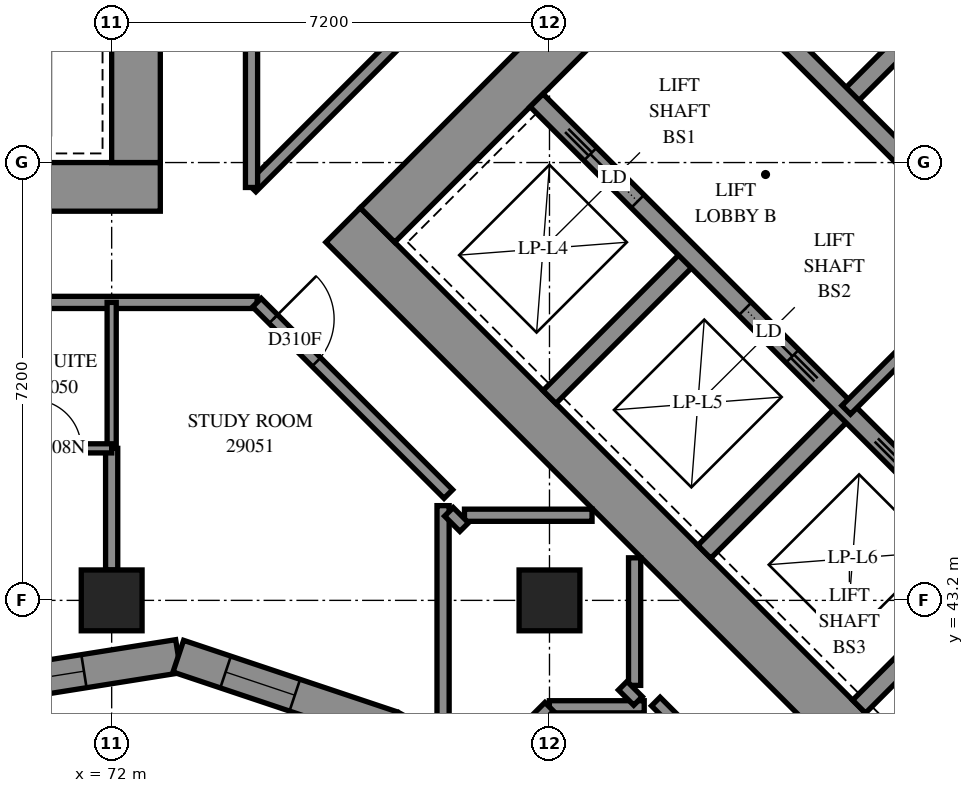
"""IFC4 building model, lengths in metres.
Left out: names, types, materials, properties, quantities, classifications, styles, units other than length and angle.
Written with IfcOpenShell. Run it as: python <this file> out.ifc"""

import sys

from ifc_helpers import new_model, si_unit, direction, frame, frame_2d, origin, origin_2d, place, context, subcontext, project, spatial, polyline, rectangle, outline, extrude, element, fill, save


model = new_model("IFC4")
c1 = context("Model", 3, precision=1e-05, world=origin(), true_north=direction((0.0, 1.0)))
c2 = subcontext(c1, "Body", "Model", "MODEL_VIEW")
j1 = project(units=[si_unit("LENGTHUNIT", "METRE"), si_unit("PLANEANGLEUNIT", "RADIAN")], contexts=[c1])
p1 = place(None, origin())
s1 = spatial("IfcSite", under=j1, at=p1, CompositionType="ELEMENT")
p2 = place(p1, origin())
s2 = spatial("IfcBuilding", under=s1, at=p2, CompositionType="ELEMENT")
p3 = place(p2, frame((0.0, 0.0, 108.4)))
s3 = spatial("IfcBuildingStorey", under=s2, at=p3, CompositionType="ELEMENT", Elevation=108.4)
for number, where, z_axis, x_axis in (
    (1, (72.0, 43.2, 0.0), (0.0, 0.0, 1.0), (1.0, 0.0, 0.0)),
    (2, (79.2, 43.2, 0.0), (0.0, 0.0, 1.0), (1.0, 0.0, 0.0)),
):
    element("IfcColumn", number, at=place(p3, frame(where, z_axis=z_axis, x_axis=x_axis)), inside=s3, PredefinedType="COLUMN", context=c2, shape_type="SweptSolid", body=[
        extrude(rectangle(XDim=1.0, YDim=1.0, at=origin_2d()), origin(), (0.0, 0.0, 1.0), 3.1),
    ])
p4 = place(p3, frame((56.8, 50.0, -0.3), z_axis=(0.0, 0.0, 1.0), x_axis=(1.0, 0.0, 0.0)))
e3 = element("IfcWall", 3, at=p4, inside=s3, PredefinedType="SHEAR", context=c2, shape_type="SweptSolid", body=[
    extrude(rectangle(XDim=16.0, YDim=0.8, at=frame_2d((8.0, 0.0))), origin(), (0.0, 0.0, 1.0), 2.7),
])
p5 = place(p3, frame((72.4, 50.4, -0.3), z_axis=(0.0, 0.0, 1.0), x_axis=(0.0, 1.0, 0.0)))
e4 = element("IfcWall", 4, at=p5, inside=s3, PredefinedType="SHEAR", context=c2, shape_type="SweptSolid", body=[
    extrude(rectangle(XDim=14.4, YDim=0.8, at=frame_2d((7.2, 0.0))), origin(), (0.0, 0.0, 1.0), 2.7),
])
p6 = place(p5, frame((4.55, 0.0, 0.3)))
e5 = element("IfcOpeningElement", 5, at=p6, cuts=e4, PredefinedType="OPENING", context=c2, shape_type="SweptSolid", body=[
    extrude(rectangle(XDim=1.1, YDim=2.1, at=frame_2d((0.55, 1.05))), frame((0.0, 0.41, 0.0), z_axis=(0.0, -1.0, 0.0), x_axis=(1.0, 0.0, 0.0)), (0.0, 0.0, 1.0), 0.82),
])
p7 = place(p5, frame((11.35, 0.0, 0.3)))
e6 = element("IfcOpeningElement", 6, at=p7, cuts=e4, PredefinedType="OPENING", context=c2, shape_type="SweptSolid", body=[
    extrude(rectangle(XDim=1.1, YDim=2.1, at=frame_2d((0.55, 1.05))), frame((0.0, 0.41, 0.0), z_axis=(0.0, -1.0, 0.0), x_axis=(1.0, 0.0, 0.0)), (0.0, 0.0, 1.0), 0.82),
])
p8 = place(p3, frame((75.806, 49.373, -0.3), z_axis=(0.0, 0.0, 1.0), x_axis=(0.7071067812, -0.7071067812, 0.0)))
e7 = element("IfcWall", 7, at=p8, inside=s3, PredefinedType="SHEAR", context=c2, shape_type="SweptSolid", body=[
    extrude(rectangle(XDim=16.0, YDim=0.8, at=frame_2d((8.0, 0.0))), origin(), (0.0, 0.0, 1.0), 2.7),
])
p9 = place(p3, frame((76.372, 49.373, -0.3), z_axis=(0.0, 0.0, 1.0), x_axis=(0.7071067812, 0.7071067812, 0.0)))
e8 = element("IfcWall", 8, at=p9, inside=s3, PredefinedType="SHEAR", context=c2, shape_type="SweptSolid", body=[
    extrude(rectangle(XDim=14.4, YDim=0.8, at=frame_2d((7.2, 0.0))), origin(), (0.0, 0.0, 1.0), 2.7),
])
p10 = place(p9, frame((4.55, 0.0, 0.3)))
e9 = element("IfcOpeningElement", 9, at=p10, cuts=e8, PredefinedType="OPENING", context=c2, shape_type="SweptSolid", body=[
    extrude(rectangle(XDim=1.1, YDim=2.1, at=frame_2d((0.55, 1.05))), frame((0.0, 0.41, 0.0), z_axis=(0.0, -1.0, 0.0), x_axis=(1.0, 0.0, 0.0)), (0.0, 0.0, 1.0), 0.82),
])
p11 = place(p9, frame((11.35, 0.0, 0.3)))
e10 = element("IfcOpeningElement", 10, at=p11, cuts=e8, PredefinedType="OPENING", context=c2, shape_type="SweptSolid", body=[
    extrude(rectangle(XDim=1.1, YDim=2.1, at=frame_2d((0.55, 1.05))), frame((0.0, 0.41, 0.0), z_axis=(0.0, -1.0, 0.0), x_axis=(1.0, 0.0, 0.0)), (0.0, 0.0, 1.0), 0.82),
])
for number, where, z_axis, x_axis in (
    (11, (79.2, 46.544, 0.0), (0.0, 0.0, 1.0), (0.707, 0.707, 0.0)),
    (12, (84.079, 51.423, 0.0), (0.0, 0.0, 1.0), (0.707, 0.707, 0.0)),
):
    element("IfcWall", number, at=place(p3, frame(where, z_axis=z_axis, x_axis=x_axis)), inside=s3, PredefinedType="SOLIDWALL", context=c2, shape_type="SweptSolid", body=[
        extrude(rectangle(XDim=3.3, YDim=0.3, at=frame_2d((1.65, 0.0))), origin(), (0.0, 0.0, 1.0), 3.1),
    ])
for number, where, z_axis, x_axis in (
    (13, (81.746, 43.999, 0.0), (0.0, 0.0, 1.0), (0.707, 0.707, 0.0)),
    (14, (84.291, 41.453, 0.0), (0.0, 0.0, 1.0), (0.707, 0.707, 0.0)),
):
    element("IfcWall", number, at=place(p3, frame(where, z_axis=z_axis, x_axis=x_axis)), inside=s3, PredefinedType="SOLIDWALL", context=c2, shape_type="SweptSolid", body=[
        extrude(rectangle(XDim=3.3, YDim=0.3, at=frame_2d((1.65, 0.0))), origin(), (0.0, 0.0, 1.0), 3.1),
    ])
p12 = place(p3, frame((78.988, 51.423, 0.0), z_axis=(0.0, 0.0, 1.0), x_axis=(0.7071067812, -0.7071067812, 0.0)))
e15 = element("IfcWall", 15, at=p12, inside=s3, PredefinedType="SOLIDWALL", context=c2, shape_type="SweptSolid", body=[
    extrude(rectangle(XDim=14.4, YDim=0.3, at=frame_2d((7.2, 0.0))), origin(), (0.0, 0.0, 1.0), 3.1),
])
p13 = place(p12, frame((1.25, 0.0, 0.0)))
e16 = element("IfcOpeningElement", 16, at=p13, cuts=e15, PredefinedType="OPENING", context=c2, shape_type="SweptSolid", body=[
    extrude(rectangle(XDim=1.1, YDim=2.1, at=frame_2d((0.55, 1.05))), frame((0.0, 0.16, 0.0), z_axis=(0.0, -1.0, 0.0), x_axis=(1.0, 0.0, 0.0)), (0.0, 0.0, 1.0), 0.32),
])
p14 = place(p12, frame((4.85, 0.0, 0.0)))
e17 = element("IfcOpeningElement", 17, at=p14, cuts=e15, PredefinedType="OPENING", context=c2, shape_type="SweptSolid", body=[
    extrude(rectangle(XDim=1.1, YDim=2.1, at=frame_2d((0.55, 1.05))), frame((0.0, 0.16, 0.0), z_axis=(0.0, -1.0, 0.0), x_axis=(1.0, 0.0, 0.0)), (0.0, 0.0, 1.0), 0.32),
])
p15 = place(p12, frame((8.45, 0.0, 0.0)))
e18 = element("IfcOpeningElement", 18, at=p15, cuts=e15, PredefinedType="OPENING", context=c2, shape_type="SweptSolid", body=[
    extrude(rectangle(XDim=1.1, YDim=2.1, at=frame_2d((0.55, 1.05))), frame((0.0, 0.16, 0.0), z_axis=(0.0, -1.0, 0.0), x_axis=(1.0, 0.0, 0.0)), (0.0, 0.0, 1.0), 0.32),
])
p16 = place(p12, frame((12.05, 0.0, 0.0)))
e19 = element("IfcOpeningElement", 19, at=p16, cuts=e15, PredefinedType="OPENING", context=c2, shape_type="SweptSolid", body=[
    extrude(rectangle(XDim=1.1, YDim=2.1, at=frame_2d((0.55, 1.05))), frame((0.0, 0.16, 0.0), z_axis=(0.0, -1.0, 0.0), x_axis=(1.0, 0.0, 0.0)), (0.0, 0.0, 1.0), 0.32),
])
p17 = place(p3, frame((81.534, 53.969, 0.0), z_axis=(0.0, 0.0, 1.0), x_axis=(0.707103309, -0.7071102534, 0.0)))
e20 = element("IfcWall", 20, at=p17, inside=s3, PredefinedType="SOLIDWALL", context=c2, shape_type="SweptSolid", body=[
    extrude(rectangle(XDim=14.4, YDim=0.3, at=frame_2d((7.2, 0.0))), origin(), (0.0, 0.0, 1.0), 3.1),
])
p18 = place(p17, frame((12.05, 0.0, 0.0)))
e21 = element("IfcOpeningElement", 21, at=p18, cuts=e20, PredefinedType="OPENING", context=c2, shape_type="SweptSolid", body=[
    extrude(rectangle(XDim=1.1, YDim=2.1, at=frame_2d((0.55, 1.05))), frame((0.0, 0.16, 0.0), z_axis=(0.0, -1.0, 0.0), x_axis=(1.0, 0.0, 0.0)), (0.0, 0.0, 1.0), 0.32),
])
p19 = place(p3, frame((83.867, 56.302, 0.0), z_axis=(0.0, 0.0, 1.0), x_axis=(0.7071137256, -0.7070998367, 0.0)))
e22 = element("IfcWall", 22, at=p19, inside=s3, PredefinedType="SOLIDWALL", context=c2, shape_type="SweptSolid", body=[
    extrude(rectangle(XDim=7.2, YDim=0.3, at=frame_2d((3.6, 0.0))), origin(), (0.0, 0.0, 1.0), 3.1),
])
p20 = place(p3, frame((69.662, 41.736, 0.0), z_axis=(0.0, 0.0, 1.0), x_axis=(0.9876057519, 0.1569550219, 0.0)))
e23 = element("IfcWall", 23, at=p20, inside=s3, PredefinedType="SOLIDWALL", context=c2, shape_type="SweptSolid", body=[
    extrude(outline(polyline([(-0.044, -0.275), (3.409, -0.275), (3.544, 0.275), (0.044, 0.275), (-0.044, -0.275)])), origin(), (0.0, 0.0, 1.0), 3.1),
])
p21 = place(p20, frame((0.705, 0.0, 0.5)))
e24 = element("IfcOpeningElement", 24, at=p21, cuts=e23, PredefinedType="OPENING", context=c2, shape_type="SweptSolid", body=[
    extrude(rectangle(XDim=1.2, YDim=2.45, at=frame_2d((0.6, 1.225))), frame((0.0, 0.285, 0.0), z_axis=(0.0, -1.0, 0.0), x_axis=(1.0, 0.0, 0.0)), (0.0, 0.0, 1.0), 0.57),
])
p22 = place(p3, frame((73.096, 42.282, 0.0), z_axis=(0.0, 0.0, 1.0), x_axis=(0.9482459269, -0.3175368672, 0.0)))
e25 = element("IfcWall", 25, at=p22, inside=s3, PredefinedType="SOLIDWALL", context=c2, shape_type="SweptSolid", body=[
    extrude(outline(polyline([(0.067, -0.275), (3.664, -0.275), (3.713, 0.275), (-0.067, 0.275), (0.067, -0.275)])), origin(), (0.0, 0.0, 1.0), 3.1),
])
p23 = place(p22, frame((0.82, 0.0, 0.5)))
e26 = element("IfcOpeningElement", 26, at=p23, cuts=e25, PredefinedType="OPENING", context=c2, shape_type="SweptSolid", body=[
    extrude(rectangle(XDim=1.2, YDim=2.45, at=frame_2d((0.6, 1.225))), frame((0.0, 0.285, 0.0), z_axis=(0.0, -1.0, 0.0), x_axis=(1.0, 0.0, 0.0)), (0.0, 0.0, 1.0), 0.57),
])
p24 = place(p3, frame((76.594, 41.111, 0.0), z_axis=(0.0, 0.0, 1.0), x_axis=(0.8760886881, -0.4821499877, 0.0)))
e27 = element("IfcWall", 27, at=p24, inside=s3, PredefinedType="SOLIDWALL", context=c2, shape_type="SweptSolid", body=[
    extrude(outline(polyline([(0.025, -0.275), (4.125, -0.275), (4.242, 0.275), (-0.025, 0.275), (0.025, -0.275)])), origin(), (0.0, 0.0, 1.0), 3.1),
])
p25 = place(p24, frame((0.334, 0.0, 0.5)))
e28 = element("IfcOpeningElement", 28, at=p25, cuts=e27, PredefinedType="OPENING", context=c2, shape_type="SweptSolid", body=[
    extrude(rectangle(XDim=1.2, YDim=2.45, at=frame_2d((0.6, 1.225))), frame((0.0, 0.285, 0.0), z_axis=(0.0, -1.0, 0.0), x_axis=(1.0, 0.0, 0.0)), (0.0, 0.0, 1.0), 0.57),
])
p26 = place(p24, frame((2.225, 0.0, 0.5)))
e29 = element("IfcOpeningElement", 29, at=p26, cuts=e27, PredefinedType="OPENING", context=c2, shape_type="SweptSolid", body=[
    extrude(rectangle(XDim=1.2, YDim=2.45, at=frame_2d((0.6, 1.225))), frame((0.0, 0.285, 0.0), z_axis=(0.0, -1.0, 0.0), x_axis=(1.0, 0.0, 0.0)), (0.0, 0.0, 1.0), 0.57),
])
p27 = place(p3, frame((84.079, 46.332, 0.0), z_axis=(0.0, 0.0, 1.0), x_axis=(0.7071067812, 0.7071067812, 0.0)))
e30 = element("IfcWall", 30, at=p27, inside=s3, PredefinedType="PARTITIONING", context=c2, shape_type="SweptSolid", body=[
    extrude(rectangle(XDim=3.6, YDim=0.2, at=frame_2d((1.8, 0.0))), origin(), (0.0, 0.0, 1.0), 3.1),
])
p28 = place(p3, frame((55.3, 48.1, 0.0), z_axis=(0.0, 0.0, 1.0), x_axis=(1.0, 0.0, 0.0)))
e31 = element("IfcWall", 31, at=p28, inside=s3, PredefinedType="PARTITIONING", context=c2, shape_type="SweptSolid", body=[
    extrude(rectangle(XDim=19.092, YDim=0.2, at=frame_2d((9.546, 0.0))), origin(), (0.0, 0.0, 1.0), 3.1),
])
p29 = place(p28, frame((4.6, 0.0, 0.0)))
e32 = element("IfcOpeningElement", 32, at=p29, cuts=e31, PredefinedType="OPENING", context=c2, shape_type="SweptSolid", body=[
    extrude(rectangle(XDim=0.9, YDim=2.1, at=frame_2d((0.45, 1.05))), frame((0.0, 0.11, 0.0), z_axis=(0.0, -1.0, 0.0), x_axis=(1.0, 0.0, 0.0)), (0.0, 0.0, 1.0), 0.22),
])
p30 = place(p28, frame((8.239, 0.0, 0.0)))
e33 = element("IfcOpeningElement", 33, at=p30, cuts=e31, PredefinedType="OPENING", context=c2, shape_type="SweptSolid", body=[
    extrude(rectangle(XDim=0.9, YDim=2.1, at=frame_2d((0.45, 1.05))), frame((0.0, 0.11, 0.0), z_axis=(0.0, -1.0, 0.0), x_axis=(1.0, 0.0, 0.0)), (0.0, 0.0, 1.0), 0.22),
])
p31 = place(p28, frame((13.5, 0.0, 0.0)))
e34 = element("IfcOpeningElement", 34, at=p31, cuts=e31, PredefinedType="OPENING", context=c2, shape_type="SweptSolid", body=[
    extrude(rectangle(XDim=0.9, YDim=2.1, at=frame_2d((0.45, 1.05))), frame((0.0, 0.11, 0.0), z_axis=(0.0, -1.0, 0.0), x_axis=(1.0, 0.0, 0.0)), (0.0, 0.0, 1.0), 0.22),
])
p32 = place(p3, frame((80.948, 41.536, 0.0), z_axis=(0.0, 0.0, 1.0), x_axis=(0.7071067812, -0.7071067812, 0.0)))
e35 = element("IfcWall", 35, at=p32, inside=s3, PredefinedType="PARTITIONING", context=c2, shape_type="SweptSolid", body=[
    extrude(rectangle(XDim=6.822, YDim=0.2, at=frame_2d((3.411, 0.0))), origin(), (0.0, 0.0, 1.0), 3.1),
])
p33 = place(p3, frame((74.301, 49.991, 0.0), z_axis=(0.0, 0.0, 1.0), x_axis=(0.7071067812, 0.7071067812, 0.0)))
e36 = element("IfcWall", 36, at=p33, inside=s3, PredefinedType="PARTITIONING", context=c2, shape_type="SweptSolid", body=[
    extrude(rectangle(XDim=5.951, YDim=0.2, at=frame_2d((2.975, 0.0))), origin(), (0.0, 0.0, 1.0), 3.1),
])
p34 = place(p3, frame((74.388, 48.096, 0.0), z_axis=(0.0, 0.0, 1.0), x_axis=(0.7071067812, -0.7071067812, 0.0)))
e37 = element("IfcWall", 37, at=p34, inside=s3, PredefinedType="PARTITIONING", context=c2, shape_type="SweptSolid", body=[
    extrude(rectangle(XDim=4.452, YDim=0.2, at=frame_2d((2.226, 0.0))), origin(), (0.0, 0.0, 1.0), 3.1),
])
p35 = place(p34, frame((0.382, 0.0, 0.0)))
e38 = element("IfcOpeningElement", 38, at=p35, cuts=e37, PredefinedType="OPENING", context=c2, shape_type="SweptSolid", body=[
    extrude(rectangle(XDim=1.0, YDim=2.1, at=frame_2d((0.5, 1.05))), frame((0.0, 0.11, 0.0), z_axis=(0.0, -1.0, 0.0), x_axis=(1.0, 0.0, 0.0)), (0.0, 0.0, 1.0), 0.22),
])
p36 = place(p3, frame((74.3, 49.99, 0.0), z_axis=(0.0, 0.0, 1.0), x_axis=(0.0, 1.0, 0.0)))
e39 = element("IfcWall", 39, at=p36, inside=s3, PredefinedType="PARTITIONING", context=c2, shape_type="SweptSolid", body=[
    extrude(rectangle(XDim=4.21, YDim=0.2, at=frame_2d((2.105, 0.0))), origin(), (0.0, 0.0, 1.0), 3.1),
])
p37 = place(p3, frame((77.45, 40.953, 0.0), z_axis=(0.0, 0.0, 1.0), x_axis=(0.0, 1.0, 0.0)))
e40 = element("IfcWall", 40, at=p37, inside=s3, PredefinedType="PARTITIONING", context=c2, shape_type="SweptSolid", body=[
    extrude(rectangle(XDim=3.804, YDim=0.2, at=frame_2d((1.902, 0.0))), origin(), (0.0, 0.0, 1.0), 3.1),
])
p38 = place(p3, frame((72.0, 45.7, 0.0), z_axis=(0.0, 0.0, 1.0), x_axis=(0.0, 1.0, 0.0)))
e41 = element("IfcWall", 41, at=p38, inside=s3, PredefinedType="PARTITIONING", context=c2, shape_type="SweptSolid", body=[
    extrude(rectangle(XDim=2.4, YDim=0.15, at=frame_2d((1.2, 0.0))), origin(), (0.0, 0.0, 1.0), 3.1),
])
for number, where, z_axis, x_axis in (
    (42, (77.802, 44.6, 0.0), (0.0, 0.0, 1.0), (1.0, 0.0, 0.0)),
    (43, (80.6, 41.802, 0.0), (0.0, 0.0, 1.0), (0.0, 1.0, 0.0)),
):
    element("IfcWall", number, at=place(p3, frame(where, z_axis=z_axis, x_axis=x_axis)), inside=s3, PredefinedType="PARTITIONING", context=c2, shape_type="SweptSolid", body=[
        extrude(rectangle(XDim=2.098, YDim=0.2, at=frame_2d((1.049, 0.0))), origin(), (0.0, 0.0, 1.0), 3.1),
    ])
p39 = place(p3, frame((72.0, 43.7, 0.0), z_axis=(0.0, 0.0, 1.0), x_axis=(0.0, 1.0, 0.0)))
e44 = element("IfcWall", 44, at=p39, inside=s3, PredefinedType="PARTITIONING", context=c2, shape_type="SweptSolid", body=[
    extrude(rectangle(XDim=2.0, YDim=0.2, at=frame_2d((1.0, 0.0))), origin(), (0.0, 0.0, 1.0), 3.1),
])
p40 = place(p3, frame((70.1, 45.7, 0.0), z_axis=(0.0, 0.0, 1.0), x_axis=(1.0, 0.0, 0.0)))
e45 = element("IfcWall", 45, at=p40, inside=s3, PredefinedType="PARTITIONING", context=c2, shape_type="SweptSolid", body=[
    extrude(rectangle(XDim=1.9, YDim=0.15, at=frame_2d((0.95, 0.0))), origin(), (0.0, 0.0, 1.0), 3.1),
])
p41 = place(p40, frame((0.598, 0.0, 0.0)))
e46 = element("IfcOpeningElement", 46, at=p41, cuts=e45, PredefinedType="OPENING", context=c2, shape_type="SweptSolid", body=[
    extrude(rectangle(XDim=0.8, YDim=2.1, at=frame_2d((0.4, 1.05))), frame((0.0, 0.085, 0.0), z_axis=(0.0, -1.0, 0.0), x_axis=(1.0, 0.0, 0.0)), (0.0, 0.0, 1.0), 0.17),
])
p42 = place(p3, frame((79.198, 41.45, 0.0), z_axis=(0.0, 0.0, 1.0), x_axis=(1.0, 0.0, 0.0)))
e47 = element("IfcWall", 47, at=p42, inside=s3, PredefinedType="PARTITIONING", context=c2, shape_type="SweptSolid", body=[
    extrude(rectangle(XDim=1.56, YDim=0.2, at=frame_2d((0.78, 0.0))), origin(), (0.0, 0.0, 1.0), 3.1),
])
p43 = place(p3, frame((78.256, 40.51, 0.0), z_axis=(0.0, 0.0, 1.0), x_axis=(0.7071067812, 0.7071067812, 0.0)))
e48 = element("IfcWall", 48, at=p43, inside=s3, PredefinedType="PARTITIONING", context=c2, shape_type="SweptSolid", body=[
    extrude(rectangle(XDim=1.329, YDim=0.2, at=frame_2d((0.665, 0.0))), origin(), (0.0, 0.0, 1.0), 3.1),
])
for number, where, z_axis, x_axis in (
    (49, (77.546, 44.656, 0.0), (0.0, 0.0, 1.0), (0.707, -0.707, 0.0)),
    (50, (80.405, 41.797, 0.0), (0.0, 0.0, 1.0), (0.707, -0.707, 0.0)),
):
    element("IfcWall", number, at=place(p3, frame(where, z_axis=z_axis, x_axis=x_axis)), inside=s3, PredefinedType="PARTITIONING", context=c2, shape_type="SweptSolid", body=[
        extrude(rectangle(XDim=0.355, YDim=0.2, at=frame_2d((0.177, 0.0))), origin(), (0.0, 0.0, 1.0), 3.1),
    ])
p44 = place(p21, origin())
e51 = element("IfcWindow", 51, at=p44, inside=s3, PartitioningType="SINGLE_PANEL", PredefinedType="WINDOW", context=c2, shape_type="SweptSolid", body=[
    extrude(rectangle(XDim=1.2, YDim=2.45, at=frame_2d((0.6, 1.225))), frame((0.0, 0.155, 0.0), z_axis=(0.0, -1.0, 0.0), x_axis=(1.0, 0.0, 0.0)), (0.0, 0.0, 1.0), 0.06),
])
fill(e24, e51)
p45 = place(p23, origin())
e52 = element("IfcWindow", 52, at=p45, inside=s3, PartitioningType="SINGLE_PANEL", PredefinedType="WINDOW", context=c2, shape_type="SweptSolid", body=[
    extrude(rectangle(XDim=1.2, YDim=2.45, at=frame_2d((0.6, 1.225))), frame((0.0, 0.155, 0.0), z_axis=(0.0, -1.0, 0.0), x_axis=(1.0, 0.0, 0.0)), (0.0, 0.0, 1.0), 0.06),
])
fill(e26, e52)
p46 = place(p13, origin())
e53 = element("IfcDoor", 53, at=p46, inside=s3, OperationType="SLIDING_TO_LEFT", PredefinedType="DOOR", context=c2, shape_type="SweptSolid", body=[
    extrude(rectangle(XDim=1.1, YDim=2.1, at=frame_2d((0.55, 1.05))), frame((0.0, 0.025, 0.0), z_axis=(0.0, -1.0, 0.0), x_axis=(1.0, 0.0, 0.0)), (0.0, 0.0, 1.0), 0.05),
])
fill(e16, e53)
p47 = place(p14, origin())
e54 = element("IfcDoor", 54, at=p47, inside=s3, OperationType="SLIDING_TO_RIGHT", PredefinedType="DOOR", context=c2, shape_type="SweptSolid", body=[
    extrude(rectangle(XDim=1.1, YDim=2.1, at=frame_2d((0.55, 1.05))), frame((0.0, 0.025, 0.0), z_axis=(0.0, -1.0, 0.0), x_axis=(1.0, 0.0, 0.0)), (0.0, 0.0, 1.0), 0.05),
])
fill(e17, e54)
p48 = place(p41, origin())
e55 = element("IfcDoor", 55, at=p48, inside=s3, OperationType="SINGLE_SWING_RIGHT", PredefinedType="DOOR", context=c2, shape_type="SweptSolid", body=[
    extrude(rectangle(XDim=0.8, YDim=2.1, at=frame_2d((0.4, 1.05))), frame((0.0, 0.025, 0.0), z_axis=(0.0, -1.0, 0.0), x_axis=(1.0, 0.0, 0.0)), (0.0, 0.0, 1.0), 0.05),
])
fill(e46, e55)
p49 = place(p35, origin())
e56 = element("IfcDoor", 56, at=p49, inside=s3, OperationType="SINGLE_SWING_LEFT", PredefinedType="DOOR", context=c2, shape_type="SweptSolid", body=[
    extrude(rectangle(XDim=1.0, YDim=2.1, at=frame_2d((0.5, 1.05))), frame((0.0, 0.025, 0.0), z_axis=(0.0, -1.0, 0.0), x_axis=(1.0, 0.0, 0.0)), (0.0, 0.0, 1.0), 0.05),
])
fill(e38, e56)
save(model, sys.argv[1])
